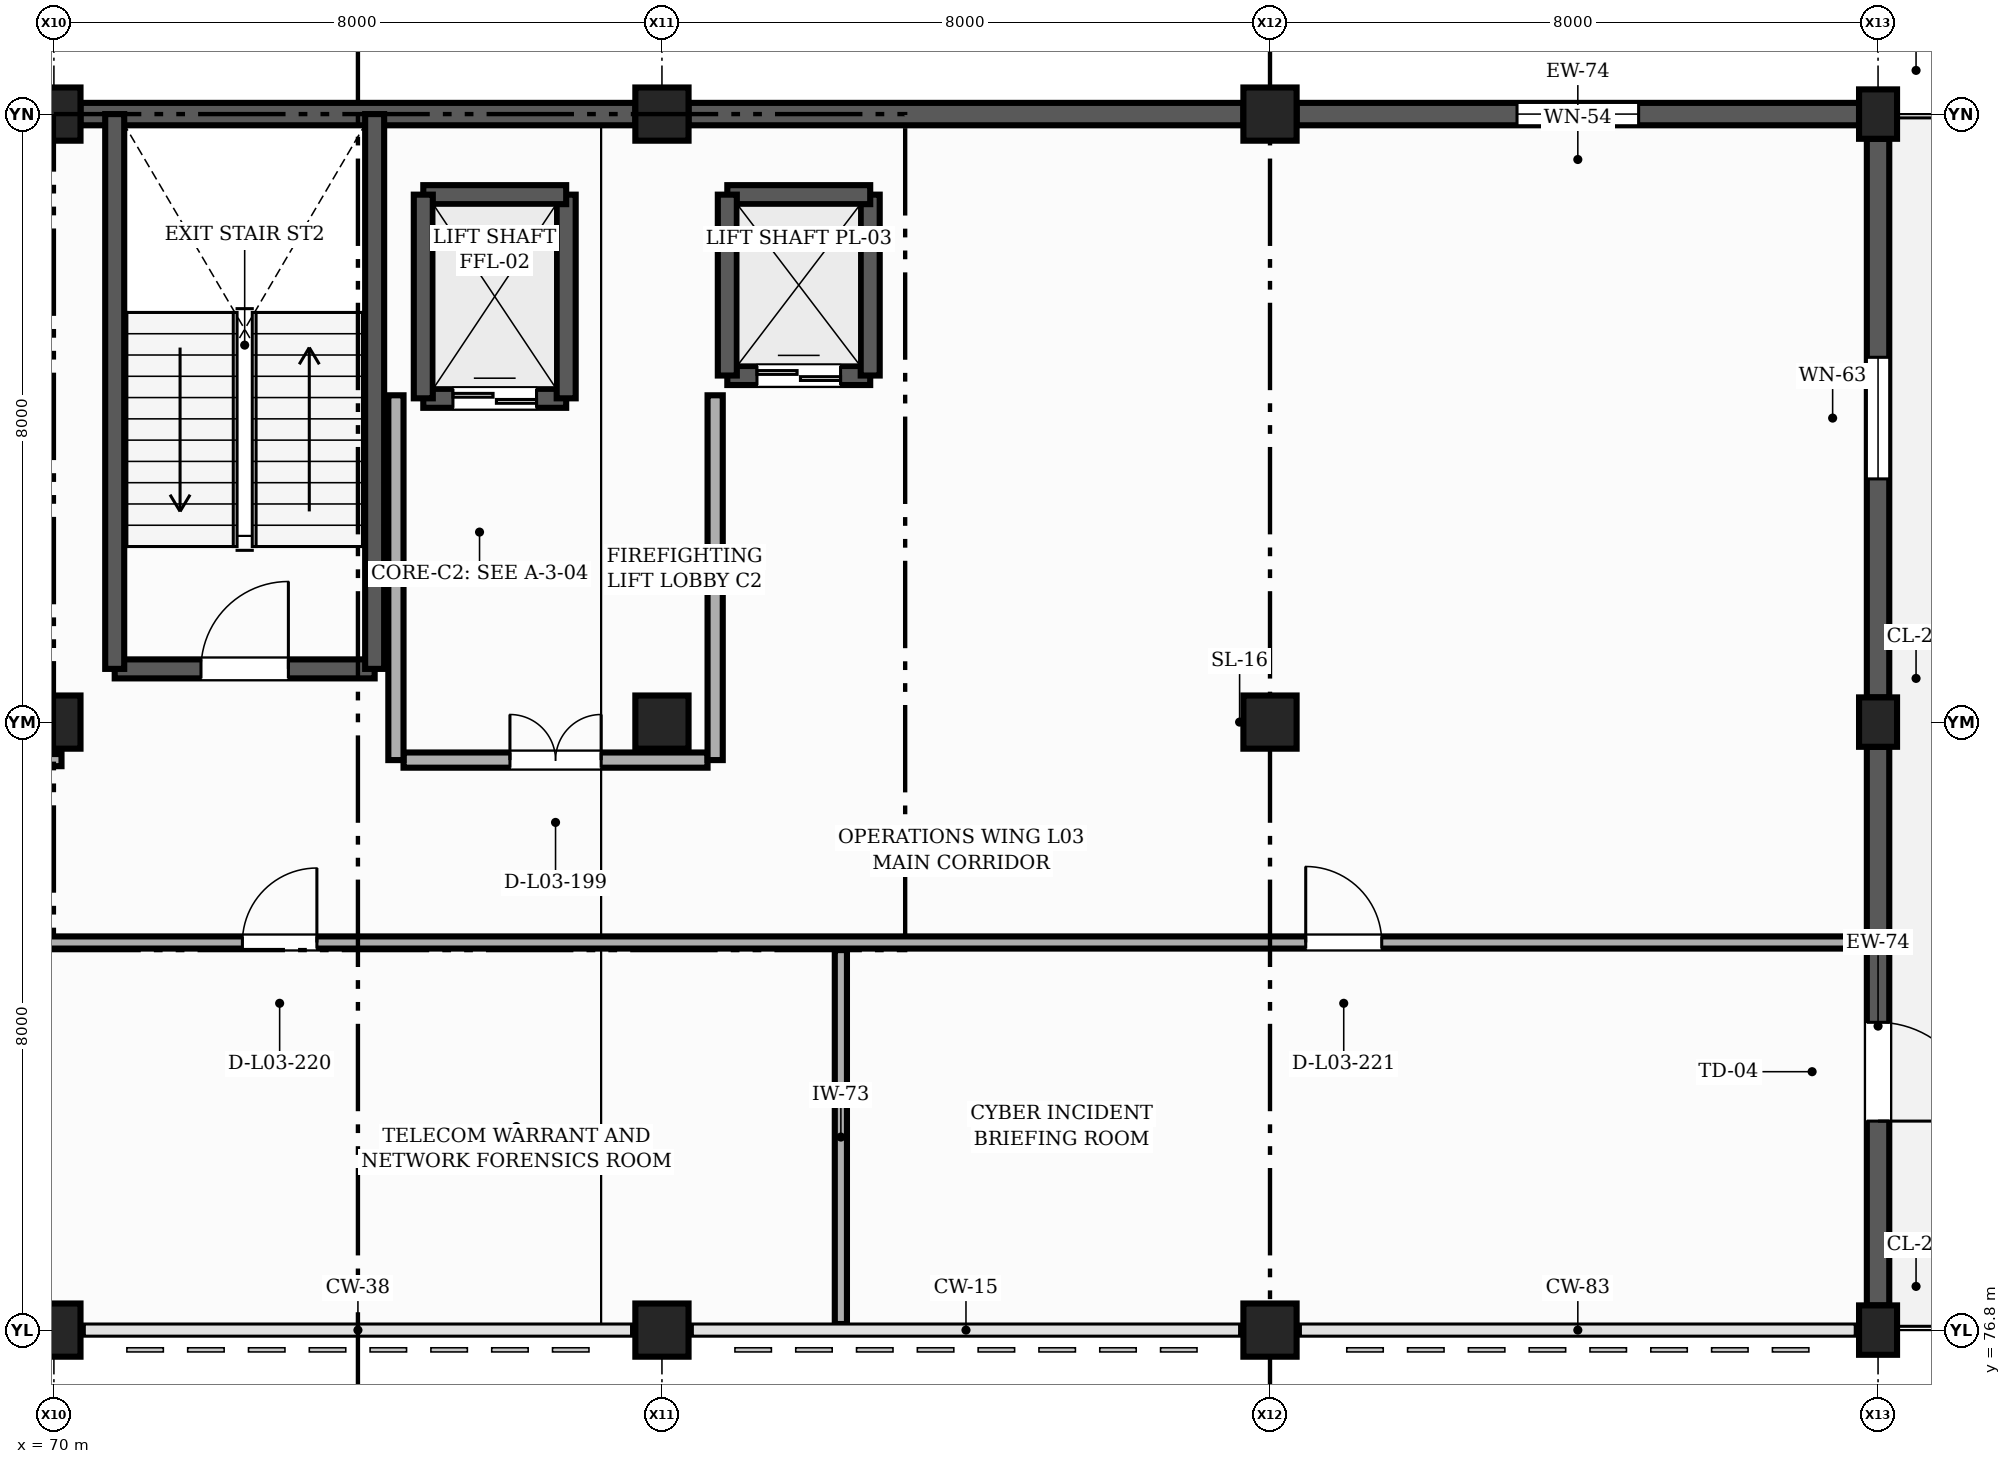
"""IFC4 building model, lengths in metres.
Left out: names, types, materials, properties, quantities, classifications, styles, units other than length and angle.
Written with IfcOpenShell. Run it as: python <this file> out.ifc"""

import sys

from ifc_helpers import new_model, si_unit, direction, frame, frame_2d, origin, origin_2d, place, context, subcontext, project, spatial, rectangle, extrude, element, fill, save


model = new_model("IFC4")
c1 = context("Model", 3, precision=1e-05, world=origin(), true_north=direction((0.0, 1.0)))
c2 = subcontext(c1, "Body", "Model", "MODEL_VIEW")
j1 = project(units=[si_unit("LENGTHUNIT", "METRE"), si_unit("PLANEANGLEUNIT", "RADIAN")], contexts=[c1])
p1 = place(None, origin())
s1 = spatial("IfcSite", under=j1, at=p1, CompositionType="ELEMENT")
p2 = place(p1, origin())
s2 = spatial("IfcBuilding", under=s1, at=p2, CompositionType="ELEMENT")
p3 = place(p2, frame((0.0, 0.0, 13.5)))
s3 = spatial("IfcBuildingStorey", under=s2, at=p3, CompositionType="ELEMENT", Elevation=13.5)
for number, where, z_axis, x_axis in (
    (1, (70.0, 76.8, 0.0), (0.0, 0.0, 1.0), (1.0, 0.0, 0.0)),
    (2, (70.0, 84.8, 0.0), (0.0, 0.0, 1.0), (1.0, 0.0, 0.0)),
    (3, (70.0, 92.8, 0.0), (0.0, 0.0, 1.0), (1.0, 0.0, 0.0)),
    (4, (78.0, 76.8, 0.0), (0.0, 0.0, 1.0), (1.0, 0.0, 0.0)),
    (5, (78.0, 84.8, 0.0), (0.0, 0.0, 1.0), (1.0, 0.0, 0.0)),
    (6, (78.0, 92.8, 0.0), (0.0, 0.0, 1.0), (1.0, 0.0, 0.0)),
    (7, (86.0, 76.8, 0.0), (0.0, 0.0, 1.0), (1.0, 0.0, 0.0)),
    (8, (86.0, 84.8, 0.0), (0.0, 0.0, 1.0), (1.0, 0.0, 0.0)),
    (9, (86.0, 92.8, 0.0), (0.0, 0.0, 1.0), (1.0, 0.0, 0.0)),
):
    element("IfcColumn", number, at=place(p3, frame(where, z_axis=z_axis, x_axis=x_axis)), inside=s3, PredefinedType="COLUMN", context=c2, shape_type="SweptSolid", body=[
        extrude(rectangle(XDim=0.7, YDim=0.7, at=origin_2d()), origin(), (0.0, 0.0, 1.0), 4.5),
    ])
for number, where, z_axis, x_axis in (
    (10, (94.0, 76.8, 0.0), (0.0, 0.0, 1.0), (1.0, 0.0, 0.0)),
    (11, (94.0, 84.8, 0.0), (0.0, 0.0, 1.0), (1.0, 0.0, 0.0)),
    (12, (94.0, 92.8, 0.0), (0.0, 0.0, 1.0), (1.0, 0.0, 0.0)),
):
    element("IfcColumn", number, at=place(p3, frame(where, z_axis=z_axis, x_axis=x_axis)), inside=s3, PredefinedType="COLUMN", context=c2, shape_type="SweptSolid", body=[
        extrude(rectangle(XDim=0.5, YDim=0.65, at=origin_2d()), origin(), (0.0, 0.0, 1.0), 4.5),
    ])
p4 = place(p3, frame((94.0, 77.125, 0.0), z_axis=(0.0, 0.0, 1.0), x_axis=(0.0, 1.0, 0.0)))
e13 = element("IfcWall", 13, at=p4, inside=s3, PredefinedType="SOLIDWALL", context=c2, shape_type="SweptSolid", body=[
    extrude(rectangle(XDim=7.35, YDim=0.295, at=frame_2d((3.675, 0.0))), origin(), (0.0, 0.0, 1.0), 3.54),
])
p5 = place(p4, frame((2.425, 0.0, 0.0)))
e14 = element("IfcOpeningElement", 14, at=p5, cuts=e13, PredefinedType="OPENING", context=c2, shape_type="SweptSolid", body=[
    extrude(rectangle(XDim=1.3, YDim=2.2, at=frame_2d((0.65, 1.1))), frame((0.0, 0.157, 0.0), z_axis=(0.0, -1.0, 0.0), x_axis=(1.0, 0.0, 0.0)), (0.0, 0.0, 1.0), 0.315),
])
p6 = place(p3, frame((94.0, 85.125, 0.0), z_axis=(0.0, 0.0, 1.0), x_axis=(0.0, 1.0, 0.0)))
e15 = element("IfcWall", 15, at=p6, inside=s3, PredefinedType="SOLIDWALL", context=c2, shape_type="SweptSolid", body=[
    extrude(rectangle(XDim=7.35, YDim=0.295, at=frame_2d((3.675, 0.0))), origin(), (0.0, 0.0, 1.0), 3.54),
])
p7 = place(p6, frame((2.875, 0.0, 0.9)))
e16 = element("IfcOpeningElement", 16, at=p7, cuts=e15, PredefinedType="OPENING", context=c2, shape_type="SweptSolid", body=[
    extrude(rectangle(XDim=1.6, YDim=1.25, at=frame_2d((0.8, 0.625))), frame((0.0, 0.157, 0.0), z_axis=(0.0, -1.0, 0.0), x_axis=(1.0, 0.0, 0.0)), (0.0, 0.0, 1.0), 0.315),
])
p8 = place(p3, frame((93.75, 92.8, 0.0), z_axis=(0.0, 0.0, 1.0), x_axis=(-1.0, 0.0, 0.0)))
e17 = element("IfcWall", 17, at=p8, inside=s3, PredefinedType="SOLIDWALL", context=c2, shape_type="SweptSolid", body=[
    extrude(rectangle(XDim=7.4, YDim=0.295, at=frame_2d((3.7, 0.0))), origin(), (0.0, 0.0, 1.0), 3.54),
])
p9 = place(p8, frame((2.9, 0.0, 0.9)))
e18 = element("IfcOpeningElement", 18, at=p9, cuts=e17, PredefinedType="OPENING", context=c2, shape_type="SweptSolid", body=[
    extrude(rectangle(XDim=1.6, YDim=2.1, at=frame_2d((0.8, 1.05))), frame((0.0, 0.157, 0.0), z_axis=(0.0, -1.0, 0.0), x_axis=(1.0, 0.0, 0.0)), (0.0, 0.0, 1.0), 0.315),
])
p10 = place(p3, frame((85.65, 92.8, 0.0), z_axis=(0.0, 0.0, 1.0), x_axis=(-1.0, 0.0, 0.0)))
e19 = element("IfcWall", 19, at=p10, inside=s3, PredefinedType="SOLIDWALL", context=c2, shape_type="SweptSolid", body=[
    extrude(rectangle(XDim=7.3, YDim=0.295, at=frame_2d((3.65, 0.0))), origin(), (0.0, 0.0, 1.0), 3.54),
])
p11 = place(p3, frame((77.65, 92.8, 0.0), z_axis=(0.0, 0.0, 1.0), x_axis=(-1.0, 0.0, 0.0)))
e20 = element("IfcWall", 20, at=p11, inside=s3, PredefinedType="SOLIDWALL", context=c2, shape_type="SweptSolid", body=[
    extrude(rectangle(XDim=7.3, YDim=0.295, at=frame_2d((3.65, 0.0))), origin(), (0.0, 0.0, 1.0), 4.19),
])
p12 = place(p3, frame((70.8, 85.5, 0.0), z_axis=(0.0, 0.0, 1.0), x_axis=(1.0, 0.0, 0.0)))
e21 = element("IfcWall", 21, at=p12, inside=s3, PredefinedType="SHEAR", context=c2, shape_type="SweptSolid", body=[
    extrude(rectangle(XDim=3.42, YDim=0.25, at=frame_2d((1.71, 0.0))), origin(), (0.0, 0.0, 1.0), 4.5),
])
p13 = place(p12, frame((1.135, 0.0, 0.0)))
e22 = element("IfcOpeningElement", 22, at=p13, cuts=e21, PredefinedType="OPENING", context=c2, shape_type="SweptSolid", body=[
    extrude(rectangle(XDim=1.15, YDim=2.15, at=frame_2d((0.575, 1.075))), frame((0.0, 0.135, 0.0), z_axis=(0.0, -1.0, 0.0), x_axis=(1.0, 0.0, 0.0)), (0.0, 0.0, 1.0), 0.27),
])
for number, where, z_axis, x_axis in (
    (23, (74.22, 85.5, 0.0), (0.0, 0.0, 1.0), (0.0, 1.0, 0.0)),
    (24, (70.8, 92.8, 0.0), (0.0, 0.0, 1.0), (0.0, -1.0, 0.0)),
):
    element("IfcWall", number, at=place(p3, frame(where, z_axis=z_axis, x_axis=x_axis)), inside=s3, PredefinedType="SHEAR", context=c2, shape_type="SweptSolid", body=[
        extrude(rectangle(XDim=7.3, YDim=0.25, at=frame_2d((3.65, 0.0))), origin(), (0.0, 0.0, 1.0), 4.5),
    ])
p14 = place(p3, frame((74.86, 89.06, 0.0), z_axis=(0.0, 0.0, 1.0), x_axis=(1.0, 0.0, 0.0)))
e25 = element("IfcWall", 25, at=p14, inside=s3, PredefinedType="SHEAR", context=c2, shape_type="SweptSolid", body=[
    extrude(rectangle(XDim=1.88, YDim=0.25, at=frame_2d((0.94, 0.0))), origin(), (0.0, 0.0, 1.0), 4.5),
])
p15 = place(p14, frame((0.39, 0.0, 0.0)))
e26 = element("IfcOpeningElement", 26, at=p15, cuts=e25, PredefinedType="OPENING", context=c2, shape_type="SweptSolid", body=[
    extrude(rectangle(XDim=1.1, YDim=2.2, at=frame_2d((0.55, 1.1))), frame((0.0, 0.135, 0.0), z_axis=(0.0, -1.0, 0.0), x_axis=(1.0, 0.0, 0.0)), (0.0, 0.0, 1.0), 0.27),
])
p16 = place(p3, frame((76.74, 89.06, 0.0), z_axis=(0.0, 0.0, 1.0), x_axis=(0.0, 1.0, 0.0)))
e27 = element("IfcWall", 27, at=p16, inside=s3, PredefinedType="SHEAR", context=c2, shape_type="SweptSolid", body=[
    extrude(rectangle(XDim=2.68, YDim=0.25, at=frame_2d((1.34, 0.0))), origin(), (0.0, 0.0, 1.0), 4.5),
])
p17 = place(p3, frame((76.74, 91.74, 0.0), z_axis=(0.0, 0.0, 1.0), x_axis=(-1.0, 0.0, 0.0)))
e28 = element("IfcWall", 28, at=p17, inside=s3, PredefinedType="SHEAR", context=c2, shape_type="SweptSolid", body=[
    extrude(rectangle(XDim=1.88, YDim=0.25, at=frame_2d((0.94, 0.0))), origin(), (0.0, 0.0, 1.0), 4.5),
])
p18 = place(p3, frame((74.86, 91.74, 0.0), z_axis=(0.0, 0.0, 1.0), x_axis=(0.0, -1.0, 0.0)))
e29 = element("IfcWall", 29, at=p18, inside=s3, PredefinedType="SHEAR", context=c2, shape_type="SweptSolid", body=[
    extrude(rectangle(XDim=2.68, YDim=0.25, at=frame_2d((1.34, 0.0))), origin(), (0.0, 0.0, 1.0), 4.5),
])
p19 = place(p3, frame((78.86, 89.36, 0.0), z_axis=(0.0, 0.0, 1.0), x_axis=(1.0, 0.0, 0.0)))
e30 = element("IfcWall", 30, at=p19, inside=s3, PredefinedType="SHEAR", context=c2, shape_type="SweptSolid", body=[
    extrude(rectangle(XDim=1.88, YDim=0.25, at=frame_2d((0.94, 0.0))), origin(), (0.0, 0.0, 1.0), 4.5),
])
p20 = place(p19, frame((0.39, 0.0, 0.0)))
e31 = element("IfcOpeningElement", 31, at=p20, cuts=e30, PredefinedType="OPENING", context=c2, shape_type="SweptSolid", body=[
    extrude(rectangle(XDim=1.1, YDim=2.2, at=frame_2d((0.55, 1.1))), frame((0.0, 0.135, 0.0), z_axis=(0.0, -1.0, 0.0), x_axis=(1.0, 0.0, 0.0)), (0.0, 0.0, 1.0), 0.27),
])
p21 = place(p3, frame((80.74, 89.36, 0.0), z_axis=(0.0, 0.0, 1.0), x_axis=(0.0, 1.0, 0.0)))
e32 = element("IfcWall", 32, at=p21, inside=s3, PredefinedType="SHEAR", context=c2, shape_type="SweptSolid", body=[
    extrude(rectangle(XDim=2.38, YDim=0.25, at=frame_2d((1.19, 0.0))), origin(), (0.0, 0.0, 1.0), 4.5),
])
p22 = place(p3, frame((80.74, 91.74, 0.0), z_axis=(0.0, 0.0, 1.0), x_axis=(-1.0, 0.0, 0.0)))
e33 = element("IfcWall", 33, at=p22, inside=s3, PredefinedType="SHEAR", context=c2, shape_type="SweptSolid", body=[
    extrude(rectangle(XDim=1.88, YDim=0.25, at=frame_2d((0.94, 0.0))), origin(), (0.0, 0.0, 1.0), 4.5),
])
p23 = place(p3, frame((78.86, 91.74, 0.0), z_axis=(0.0, 0.0, 1.0), x_axis=(0.0, -1.0, 0.0)))
e34 = element("IfcWall", 34, at=p23, inside=s3, PredefinedType="SHEAR", context=c2, shape_type="SweptSolid", body=[
    extrude(rectangle(XDim=2.38, YDim=0.25, at=frame_2d((1.19, 0.0))), origin(), (0.0, 0.0, 1.0), 4.5),
])
p24 = place(p3, frame((74.6, 84.3, 0.0), z_axis=(0.0, 0.0, 1.0), x_axis=(1.0, 0.0, 0.0)))
e35 = element("IfcWall", 35, at=p24, inside=s3, PredefinedType="PARTITIONING", context=c2, shape_type="SweptSolid", body=[
    extrude(rectangle(XDim=4.0, YDim=0.2, at=frame_2d((2.0, 0.0))), origin(), (0.0, 0.0, 1.0), 3.575),
])
p25 = place(p24, frame((1.4, 0.0, 0.0)))
e36 = element("IfcOpeningElement", 36, at=p25, cuts=e35, PredefinedType="OPENING", context=c2, shape_type="SweptSolid", body=[
    extrude(rectangle(XDim=1.2, YDim=2.15, at=frame_2d((0.6, 1.075))), frame((0.0, 0.11, 0.0), z_axis=(0.0, -1.0, 0.0), x_axis=(1.0, 0.0, 0.0)), (0.0, 0.0, 1.0), 0.22),
])
p26 = place(p3, frame((74.5, 84.3, 0.0), z_axis=(0.0, 0.0, 1.0), x_axis=(0.0, 1.0, 0.0)))
e37 = element("IfcWall", 37, at=p26, inside=s3, PredefinedType="PARTITIONING", context=c2, shape_type="SweptSolid", body=[
    extrude(rectangle(XDim=4.8, YDim=0.2, at=frame_2d((2.4, 0.0))), origin(), (0.0, 0.0, 1.0), 3.425),
])
p27 = place(p3, frame((78.7, 84.3, 0.0), z_axis=(0.0, 0.0, 1.0), x_axis=(0.0, 1.0, 0.0)))
e38 = element("IfcWall", 38, at=p27, inside=s3, PredefinedType="PARTITIONING", context=c2, shape_type="SweptSolid", body=[
    extrude(rectangle(XDim=4.8, YDim=0.2, at=frame_2d((2.4, 0.0))), origin(), (0.0, 0.0, 1.0), 3.475),
])
p28 = place(p3, frame((80.354, 76.88, 0.0), z_axis=(0.0, 0.0, 1.0), x_axis=(0.0, 1.0, 0.0)))
e39 = element("IfcWall", 39, at=p28, inside=s3, PredefinedType="PARTITIONING", context=c2, shape_type="SweptSolid", body=[
    extrude(rectangle(XDim=4.92, YDim=0.16, at=frame_2d((2.46, 0.0))), origin(), (0.0, 0.0, 1.0), 3.525),
])
p29 = place(p3, frame((29.3, 81.9, 0.0), z_axis=(0.0, 0.0, 1.0), x_axis=(1.0, 0.0, 0.0)))
e40 = element("IfcWall", 40, at=p29, inside=s3, PredefinedType="PARTITIONING", context=c2, shape_type="SweptSolid", body=[
    extrude(rectangle(XDim=64.62, YDim=0.16, at=frame_2d((32.31, 0.0))), origin(), (0.0, 0.0, 1.0), 3.525),
])
p30 = place(p29, frame((9.17, 0.0, 0.0)))
e41 = element("IfcOpeningElement", 41, at=p30, cuts=e40, PredefinedType="OPENING", context=c2, shape_type="SweptSolid", body=[
    extrude(rectangle(XDim=0.92, YDim=2.1, at=frame_2d((0.46, 1.05))), frame((0.0, 0.09, 0.0), z_axis=(0.0, -1.0, 0.0), x_axis=(1.0, 0.0, 0.0)), (0.0, 0.0, 1.0), 0.18),
])
p31 = place(p29, frame((27.4, 0.0, 0.0)))
e42 = element("IfcOpeningElement", 42, at=p31, cuts=e40, PredefinedType="OPENING", context=c2, shape_type="SweptSolid", body=[
    extrude(rectangle(XDim=0.95, YDim=2.1, at=frame_2d((0.475, 1.05))), frame((0.0, 0.09, 0.0), z_axis=(0.0, -1.0, 0.0), x_axis=(1.0, 0.0, 0.0)), (0.0, 0.0, 1.0), 0.18),
])
p32 = place(p29, frame((43.18, 0.0, 0.0)))
e43 = element("IfcOpeningElement", 43, at=p32, cuts=e40, PredefinedType="OPENING", context=c2, shape_type="SweptSolid", body=[
    extrude(rectangle(XDim=0.98, YDim=2.12, at=frame_2d((0.49, 1.06))), frame((0.0, 0.09, 0.0), z_axis=(0.0, -1.0, 0.0), x_axis=(1.0, 0.0, 0.0)), (0.0, 0.0, 1.0), 0.18),
])
p33 = place(p29, frame((57.17, 0.0, 0.0)))
e44 = element("IfcOpeningElement", 44, at=p33, cuts=e40, PredefinedType="OPENING", context=c2, shape_type="SweptSolid", body=[
    extrude(rectangle(XDim=1.0, YDim=2.1, at=frame_2d((0.5, 1.05))), frame((0.0, 0.09, 0.0), z_axis=(0.0, -1.0, 0.0), x_axis=(1.0, 0.0, 0.0)), (0.0, 0.0, 1.0), 0.18),
])
p34 = place(p3, frame((34.7, 84.3, 0.0), z_axis=(0.0, 0.0, 1.0), x_axis=(1.0, 0.0, 0.0)))
e45 = element("IfcWall", 45, at=p34, inside=s3, PredefinedType="PARTITIONING", context=c2, shape_type="SweptSolid", body=[
    extrude(rectangle(XDim=35.4, YDim=0.16, at=frame_2d((17.7, 0.0))), origin(), (0.0, 0.0, 1.0), 3.575),
])
p35 = place(p34, frame((5.92, 0.0, 0.0)))
e46 = element("IfcOpeningElement", 46, at=p35, cuts=e45, PredefinedType="OPENING", context=c2, shape_type="SweptSolid", body=[
    extrude(rectangle(XDim=1.02, YDim=2.12, at=frame_2d((0.51, 1.06))), frame((0.0, 0.09, 0.0), z_axis=(0.0, -1.0, 0.0), x_axis=(1.0, 0.0, 0.0)), (0.0, 0.0, 1.0), 0.18),
])
p36 = place(p34, frame((17.2, 0.0, 0.0)))
e47 = element("IfcOpeningElement", 47, at=p36, cuts=e45, PredefinedType="OPENING", context=c2, shape_type="SweptSolid", body=[
    extrude(rectangle(XDim=0.95, YDim=2.15, at=frame_2d((0.475, 1.075))), frame((0.0, 0.09, 0.0), z_axis=(0.0, -1.0, 0.0), x_axis=(1.0, 0.0, 0.0)), (0.0, 0.0, 1.0), 0.18),
])
p37 = place(p34, frame((28.48, 0.0, 0.0)))
e48 = element("IfcOpeningElement", 48, at=p37, cuts=e45, PredefinedType="OPENING", context=c2, shape_type="SweptSolid", body=[
    extrude(rectangle(XDim=1.08, YDim=2.14, at=frame_2d((0.54, 1.07))), frame((0.0, 0.09, 0.0), z_axis=(0.0, -1.0, 0.0), x_axis=(1.0, 0.0, 0.0)), (0.0, 0.0, 1.0), 0.18),
])
p38 = place(p5, frame((1.3, 0.0, 0.0), z_axis=(0.0, 0.0, 1.0), x_axis=(-1.0, 0.0, 0.0)))
e49 = element("IfcDoor", 49, at=p38, inside=s3, OperationType="SINGLE_SWING_RIGHT", PredefinedType="DOOR", context=c2, shape_type="SweptSolid", body=[
    extrude(rectangle(XDim=1.3, YDim=2.2, at=frame_2d((0.65, 1.1))), frame((0.0, 0.025, 0.0), z_axis=(0.0, -1.0, 0.0), x_axis=(1.0, 0.0, 0.0)), (0.0, 0.0, 1.0), 0.05),
])
fill(e14, e49)
p39 = place(p7, origin())
e50 = element("IfcWindow", 50, at=p39, inside=s3, PartitioningType="SINGLE_PANEL", PredefinedType="WINDOW", context=c2, shape_type="SweptSolid", body=[
    extrude(rectangle(XDim=1.6, YDim=1.25, at=frame_2d((0.8, 0.625))), frame((0.0, 0.03, 0.0), z_axis=(0.0, -1.0, 0.0), x_axis=(1.0, 0.0, 0.0)), (0.0, 0.0, 1.0), 0.06),
])
fill(e16, e50)
p40 = place(p9, origin())
e51 = element("IfcWindow", 51, at=p40, inside=s3, PartitioningType="SINGLE_PANEL", PredefinedType="WINDOW", context=c2, shape_type="SweptSolid", body=[
    extrude(rectangle(XDim=1.6, YDim=2.1, at=frame_2d((0.8, 1.05))), frame((0.0, 0.03, 0.0), z_axis=(0.0, -1.0, 0.0), x_axis=(1.0, 0.0, 0.0)), (0.0, 0.0, 1.0), 0.06),
])
fill(e18, e51)
p41 = place(p13, origin())
e52 = element("IfcDoor", 52, at=p41, inside=s3, OperationType="SINGLE_SWING_RIGHT", PredefinedType="DOOR", context=c2, shape_type="SweptSolid", body=[
    extrude(rectangle(XDim=1.15, YDim=2.15, at=frame_2d((0.575, 1.075))), frame((0.0, 0.025, 0.0), z_axis=(0.0, -1.0, 0.0), x_axis=(1.0, 0.0, 0.0)), (0.0, 0.0, 1.0), 0.05),
])
fill(e22, e52)
p42 = place(p15, origin())
e53 = element("IfcDoor", 53, at=p42, inside=s3, OperationType="DOUBLE_DOOR_SLIDING", PredefinedType="DOOR", context=c2, shape_type="SweptSolid", body=[
    extrude(rectangle(XDim=1.1, YDim=2.2, at=frame_2d((0.55, 1.1))), frame((0.0, 0.025, 0.0), z_axis=(0.0, -1.0, 0.0), x_axis=(1.0, 0.0, 0.0)), (0.0, 0.0, 1.0), 0.05),
])
fill(e26, e53)
p43 = place(p20, origin())
e54 = element("IfcDoor", 54, at=p43, inside=s3, OperationType="DOUBLE_DOOR_SLIDING", PredefinedType="DOOR", context=c2, shape_type="SweptSolid", body=[
    extrude(rectangle(XDim=1.1, YDim=2.2, at=frame_2d((0.55, 1.1))), frame((0.0, 0.025, 0.0), z_axis=(0.0, -1.0, 0.0), x_axis=(1.0, 0.0, 0.0)), (0.0, 0.0, 1.0), 0.05),
])
fill(e31, e54)
p44 = place(p25, origin())
e55 = element("IfcDoor", 55, at=p44, inside=s3, OperationType="DOUBLE_DOOR_SINGLE_SWING", PredefinedType="DOOR", context=c2, shape_type="SweptSolid", body=[
    extrude(rectangle(XDim=1.2, YDim=2.15, at=frame_2d((0.6, 1.075))), frame((0.0, 0.025, 0.0), z_axis=(0.0, -1.0, 0.0), x_axis=(1.0, 0.0, 0.0)), (0.0, 0.0, 1.0), 0.05),
])
fill(e36, e55)
p45 = place(p32, origin())
e56 = element("IfcDoor", 56, at=p45, inside=s3, OperationType="SINGLE_SWING_RIGHT", PredefinedType="DOOR", context=c2, shape_type="SweptSolid", body=[
    extrude(rectangle(XDim=0.98, YDim=2.12, at=frame_2d((0.49, 1.06))), frame((0.0, 0.025, 0.0), z_axis=(0.0, -1.0, 0.0), x_axis=(1.0, 0.0, 0.0)), (0.0, 0.0, 1.0), 0.05),
])
fill(e43, e56)
p46 = place(p33, origin())
e57 = element("IfcDoor", 57, at=p46, inside=s3, OperationType="SINGLE_SWING_LEFT", PredefinedType="DOOR", context=c2, shape_type="SweptSolid", body=[
    extrude(rectangle(XDim=1.0, YDim=2.1, at=frame_2d((0.5, 1.05))), frame((0.0, 0.025, 0.0), z_axis=(0.0, -1.0, 0.0), x_axis=(1.0, 0.0, 0.0)), (0.0, 0.0, 1.0), 0.05),
])
fill(e44, e57)
save(model, sys.argv[1])
